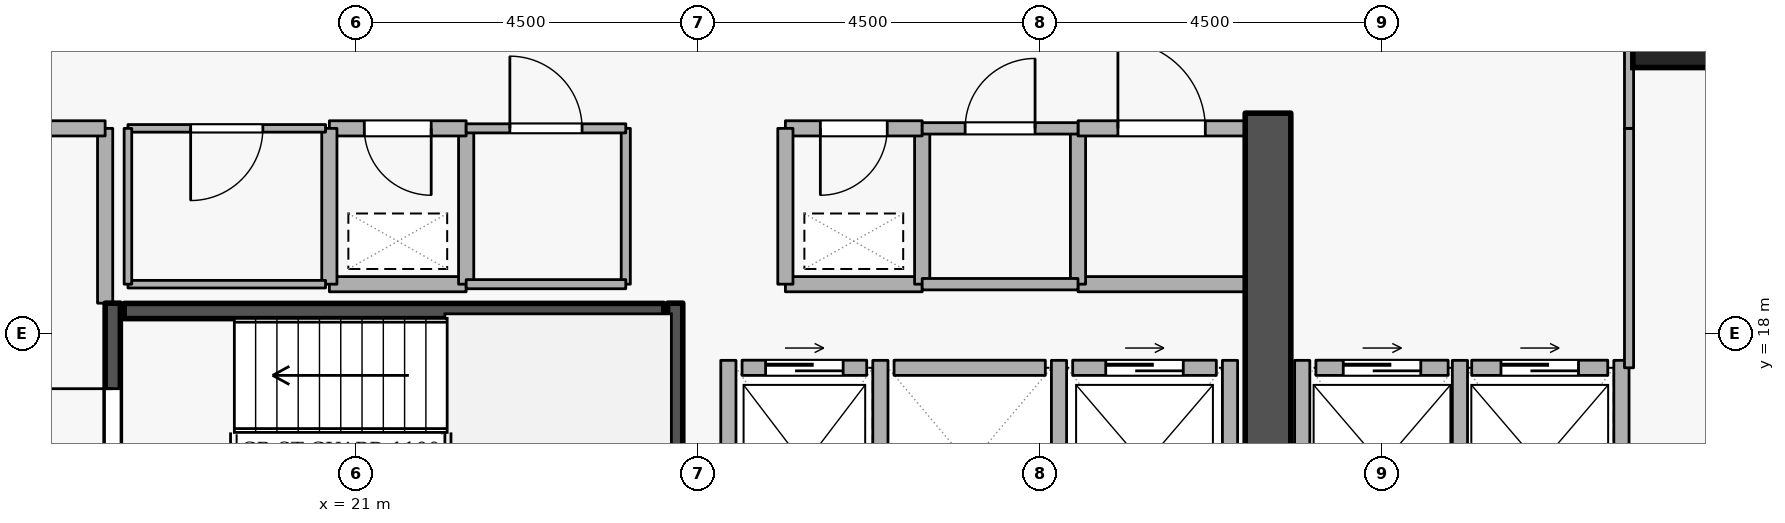
"""IFC4 building model, lengths in metres.
Left out: names, types, materials, properties, quantities, classifications, styles, units other than length and angle.
Written with IfcOpenShell. Run it as: python <this file> out.ifc"""

import sys

from ifc_helpers import new_model, si_unit, direction, frame, frame_2d, origin, origin_2d, place, context, subcontext, project, spatial, rectangle, extrude, element, fill, save


model = new_model("IFC4")
c1 = context("Model", 3, precision=1e-05, world=origin(), true_north=direction((0.0, 1.0)))
c2 = subcontext(c1, "Body", "Model", "MODEL_VIEW")
j1 = project(units=[si_unit("LENGTHUNIT", "METRE"), si_unit("PLANEANGLEUNIT", "RADIAN")], contexts=[c1])
p1 = place(None, origin())
s1 = spatial("IfcSite", under=j1, at=p1, CompositionType="ELEMENT")
p2 = place(p1, origin())
s2 = spatial("IfcBuilding", under=s1, at=p2, CompositionType="ELEMENT")
p3 = place(p2, frame((0.0, 0.0, 27.9)))
s3 = spatial("IfcBuildingStorey", under=s2, at=p3, CompositionType="ELEMENT", Elevation=27.9)
p4 = place(p3, frame((33.0, 15.2, 0.0), z_axis=(0.0, 0.0, 1.0), x_axis=(0.0, 1.0, 0.0)))
e1 = element("IfcWall", 1, at=p4, inside=s3, PredefinedType="SHEAR", context=c2, shape_type="SweptSolid", body=[
    extrude(rectangle(XDim=5.7, YDim=0.6, at=frame_2d((2.85, 0.0))), origin(), (0.0, 0.0, 1.0), 3.6),
])
p5 = place(p3, frame((38.5, 22.2, 0.0), z_axis=(0.0, 0.0, 1.0), x_axis=(1.0, 0.0, 0.0)))
e2 = element("IfcColumn", 2, at=p5, inside=s3, PredefinedType="COLUMN", context=c2, shape_type="SweptSolid", body=[
    extrude(rectangle(XDim=1.4, YDim=1.4, at=origin_2d()), origin(), (0.0, 0.0, 1.0), 3.6),
])
p6 = place(p3, frame((26.08, 17.55, 0.0), z_axis=(0.0, 0.0, 1.0), x_axis=(1.0, 0.0, 0.0)))
e3 = element("IfcWall", 3, at=p6, inside=s3, PredefinedType="STANDARD", context=c2, shape_type="SweptSolid", body=[
    extrude(rectangle(XDim=1.64, YDim=0.2, at=frame_2d((0.82, 0.0))), origin(), (0.0, 0.0, 1.0), 3.34),
])
p7 = place(p6, frame((0.31, 0.0, 0.0)))
e4 = element("IfcOpeningElement", 4, at=p7, cuts=e3, PredefinedType="OPENING", context=c2, shape_type="SweptSolid", body=[
    extrude(rectangle(XDim=1.02, YDim=2.06, at=frame_2d((0.51, 1.03))), frame((0.0, 0.11, 0.0), z_axis=(0.0, -1.0, 0.0), x_axis=(1.0, 0.0, 0.0)), (0.0, 0.0, 1.0), 0.22),
])
p8 = place(p3, frame((28.08, 17.55, 0.0), z_axis=(0.0, 0.0, 1.0), x_axis=(1.0, 0.0, 0.0)))
e5 = element("IfcWall", 5, at=p8, inside=s3, PredefinedType="STANDARD", context=c2, shape_type="SweptSolid", body=[
    extrude(rectangle(XDim=1.99, YDim=0.2, at=frame_2d((0.995, 0.0))), origin(), (0.0, 0.0, 1.0), 3.34),
])
p9 = place(p3, frame((30.43, 17.55, 0.0), z_axis=(0.0, 0.0, 1.0), x_axis=(1.0, 0.0, 0.0)))
e6 = element("IfcWall", 6, at=p9, inside=s3, PredefinedType="STANDARD", context=c2, shape_type="SweptSolid", body=[
    extrude(rectangle(XDim=1.89, YDim=0.2, at=frame_2d((0.945, 0.0))), origin(), (0.0, 0.0, 1.0), 3.34),
])
p10 = place(p9, frame((0.435, 0.0, 0.0)))
e7 = element("IfcOpeningElement", 7, at=p10, cuts=e6, PredefinedType="OPENING", context=c2, shape_type="SweptSolid", body=[
    extrude(rectangle(XDim=1.02, YDim=2.06, at=frame_2d((0.51, 1.03))), frame((0.0, 0.11, 0.0), z_axis=(0.0, -1.0, 0.0), x_axis=(1.0, 0.0, 0.0)), (0.0, 0.0, 1.0), 0.22),
])
p11 = place(p3, frame((33.63, 17.55, 0.0), z_axis=(0.0, 0.0, 1.0), x_axis=(1.0, 0.0, 0.0)))
e8 = element("IfcWall", 8, at=p11, inside=s3, PredefinedType="STANDARD", context=c2, shape_type="SweptSolid", body=[
    extrude(rectangle(XDim=1.74, YDim=0.2, at=frame_2d((0.87, 0.0))), origin(), (0.0, 0.0, 1.0), 3.34),
])
p12 = place(p11, frame((0.36, 0.0, 0.0)))
e9 = element("IfcOpeningElement", 9, at=p12, cuts=e8, PredefinedType="OPENING", context=c2, shape_type="SweptSolid", body=[
    extrude(rectangle(XDim=1.02, YDim=2.06, at=frame_2d((0.51, 1.03))), frame((0.0, 0.11, 0.0), z_axis=(0.0, -1.0, 0.0), x_axis=(1.0, 0.0, 0.0)), (0.0, 0.0, 1.0), 0.22),
])
p13 = place(p3, frame((35.68, 17.55, 0.0), z_axis=(0.0, 0.0, 1.0), x_axis=(1.0, 0.0, 0.0)))
e10 = element("IfcWall", 10, at=p13, inside=s3, PredefinedType="STANDARD", context=c2, shape_type="SweptSolid", body=[
    extrude(rectangle(XDim=1.79, YDim=0.2, at=frame_2d((0.895, 0.0))), origin(), (0.0, 0.0, 1.0), 3.34),
])
p14 = place(p13, frame((0.385, 0.0, 0.0)))
e11 = element("IfcOpeningElement", 11, at=p14, cuts=e10, PredefinedType="OPENING", context=c2, shape_type="SweptSolid", body=[
    extrude(rectangle(XDim=1.02, YDim=2.06, at=frame_2d((0.51, 1.03))), frame((0.0, 0.11, 0.0), z_axis=(0.0, -1.0, 0.0), x_axis=(1.0, 0.0, 0.0)), (0.0, 0.0, 1.0), 0.22),
])
for number, where, z_axis, x_axis in (
    (12, (27.9, 15.212, 0.0), (0.0, 0.0, 1.0), (0.0, 1.0, 0.0)),
    (13, (25.9, 15.212, 0.0), (0.0, 0.0, 1.0), (0.0, 1.0, 0.0)),
    (14, (30.25, 15.212, 0.0), (0.0, 0.0, 1.0), (0.0, 1.0, 0.0)),
    (15, (32.5, 15.212, 0.0), (0.0, 0.0, 1.0), (0.0, 1.0, 0.0)),
):
    element("IfcWall", number, at=place(p3, frame(where, z_axis=z_axis, x_axis=x_axis)), inside=s3, PredefinedType="STANDARD", context=c2, shape_type="SweptSolid", body=[
        extrude(rectangle(XDim=2.436, YDim=0.2, at=frame_2d((1.218, 0.0))), origin(), (0.0, 0.0, 1.0), 3.34),
    ])
for number, where, z_axis, x_axis in (
    (16, (35.525, 15.012, 0.0), (0.0, 0.0, 1.0), (0.0, 1.0, 0.0)),
    (17, (33.45, 15.012, 0.0), (0.0, 0.0, 1.0), (0.0, 1.0, 0.0)),
    (18, (37.65, 15.012, 0.0), (0.0, 0.0, 1.0), (0.0, 1.0, 0.0)),
):
    element("IfcWall", number, at=place(p3, frame(where, z_axis=z_axis, x_axis=x_axis)), inside=s3, PredefinedType="STANDARD", context=c2, shape_type="SweptSolid", body=[
        extrude(rectangle(XDim=2.636, YDim=0.2, at=frame_2d((1.318, 0.0))), origin(), (0.0, 0.0, 1.0), 3.34),
    ])
p15 = place(p3, frame((17.8, 15.05, 0.0), z_axis=(0.0, 0.0, 1.0), x_axis=(0.0, 1.0, 0.0)))
e19 = element("IfcWall", 19, at=p15, inside=s3, PredefinedType="SHEAR", context=c2, shape_type="SweptSolid", body=[
    extrude(rectangle(XDim=3.35, YDim=0.2, at=frame_2d((1.675, 0.0))), origin(), (0.0, 0.0, 1.0), 3.6),
])
p16 = place(p15, frame((1.125, 0.0, 0.0)))
e20 = element("IfcOpeningElement", 20, at=p16, cuts=e19, PredefinedType="OPENING", context=c2, shape_type="SweptSolid", body=[
    extrude(rectangle(XDim=1.1, YDim=2.1, at=frame_2d((0.55, 1.05))), frame((0.0, 0.11, 0.0), z_axis=(0.0, -1.0, 0.0), x_axis=(1.0, 0.0, 0.0)), (0.0, 0.0, 1.0), 0.22),
])
p17 = place(p3, frame((25.2, 18.4, 0.0), z_axis=(0.0, 0.0, 1.0), x_axis=(0.0, -1.0, 0.0)))
e21 = element("IfcWall", 21, at=p17, inside=s3, PredefinedType="SHEAR", context=c2, shape_type="SweptSolid", body=[
    extrude(rectangle(XDim=3.35, YDim=0.2, at=frame_2d((1.675, 0.0))), origin(), (0.0, 0.0, 1.0), 3.6),
])
p18 = place(p3, frame((25.05, 18.297, 0.0), z_axis=(0.0, 0.0, 1.0), x_axis=(-1.0, 0.0, 0.0)))
e22 = element("IfcWall", 22, at=p18, inside=s3, PredefinedType="SHEAR", context=c2, shape_type="SweptSolid", body=[
    extrude(rectangle(XDim=7.1, YDim=0.2, at=frame_2d((3.55, 0.0))), origin(), (0.0, 0.0, 1.0), 3.6),
])
p19 = place(p3, frame((17.7, 18.4, 0.0), z_axis=(0.0, 0.0, 1.0), x_axis=(0.0, 1.0, 0.0)))
e23 = element("IfcWall", 23, at=p19, inside=s3, PredefinedType="STANDARD", context=c2, shape_type="SweptSolid", body=[
    extrude(rectangle(XDim=2.3, YDim=0.2, at=frame_2d((1.15, 0.0))), origin(), (0.0, 0.0, 1.0), 2.545),
])
p20 = place(p3, frame((17.7, 20.7, 0.0), z_axis=(0.0, 0.0, 1.0), x_axis=(-1.0, 0.0, 0.0)))
e24 = element("IfcWall", 24, at=p20, inside=s3, PredefinedType="STANDARD", context=c2, shape_type="SweptSolid", body=[
    extrude(rectangle(XDim=2.5, YDim=0.2, at=frame_2d((1.25, 0.0))), origin(), (0.0, 0.0, 1.0), 3.34),
])
p21 = place(p3, frame((26.65, 18.65, 0.0), z_axis=(0.0, 0.0, 1.0), x_axis=(1.0, 0.0, 0.0)))
e25 = element("IfcWall", 25, at=p21, inside=s3, PredefinedType="STANDARD", context=c2, shape_type="SweptSolid", body=[
    extrude(rectangle(XDim=1.8, YDim=0.2, at=frame_2d((0.9, 0.0))), origin(), (0.0, 0.0, 1.0), 3.34),
])
p22 = place(p3, frame((28.45, 18.65, 0.0), z_axis=(0.0, 0.0, 1.0), x_axis=(0.0, 1.0, 0.0)))
e26 = element("IfcWall", 26, at=p22, inside=s3, PredefinedType="STANDARD", context=c2, shape_type="SweptSolid", body=[
    extrude(rectangle(XDim=2.05, YDim=0.2, at=frame_2d((1.025, 0.0))), origin(), (0.0, 0.0, 1.0), 3.34),
])
p23 = place(p3, frame((28.45, 20.7, 0.0), z_axis=(0.0, 0.0, 1.0), x_axis=(-1.0, 0.0, 0.0)))
e27 = element("IfcWall", 27, at=p23, inside=s3, PredefinedType="STANDARD", context=c2, shape_type="SweptSolid", body=[
    extrude(rectangle(XDim=1.8, YDim=0.2, at=frame_2d((0.9, 0.0))), origin(), (0.0, 0.0, 1.0), 3.34),
])
p24 = place(p23, frame((0.46, 0.0, 0.0)))
e28 = element("IfcOpeningElement", 28, at=p24, cuts=e27, PredefinedType="OPENING", context=c2, shape_type="SweptSolid", body=[
    extrude(rectangle(XDim=0.88, YDim=2.04, at=frame_2d((0.44, 1.02))), frame((0.0, 0.11, 0.0), z_axis=(0.0, -1.0, 0.0), x_axis=(1.0, 0.0, 0.0)), (0.0, 0.0, 1.0), 0.22),
])
p25 = place(p3, frame((26.65, 20.7, 0.0), z_axis=(0.0, 0.0, 1.0), x_axis=(0.0, -1.0, 0.0)))
e29 = element("IfcWall", 29, at=p25, inside=s3, PredefinedType="STANDARD", context=c2, shape_type="SweptSolid", body=[
    extrude(rectangle(XDim=2.05, YDim=0.2, at=frame_2d((1.025, 0.0))), origin(), (0.0, 0.0, 1.0), 3.34),
])
p26 = place(p3, frame((20.65, 18.65, 0.0), z_axis=(0.0, 0.0, 1.0), x_axis=(1.0, 0.0, 0.0)))
e30 = element("IfcWall", 30, at=p26, inside=s3, PredefinedType="STANDARD", context=c2, shape_type="SweptSolid", body=[
    extrude(rectangle(XDim=1.8, YDim=0.2, at=frame_2d((0.9, 0.0))), origin(), (0.0, 0.0, 1.0), 3.34),
])
p27 = place(p3, frame((22.45, 18.65, 0.0), z_axis=(0.0, 0.0, 1.0), x_axis=(0.0, 1.0, 0.0)))
e31 = element("IfcWall", 31, at=p27, inside=s3, PredefinedType="STANDARD", context=c2, shape_type="SweptSolid", body=[
    extrude(rectangle(XDim=2.05, YDim=0.2, at=frame_2d((1.025, 0.0))), origin(), (0.0, 0.0, 1.0), 3.34),
])
p28 = place(p3, frame((22.45, 20.7, 0.0), z_axis=(0.0, 0.0, 1.0), x_axis=(-1.0, 0.0, 0.0)))
e32 = element("IfcWall", 32, at=p28, inside=s3, PredefinedType="STANDARD", context=c2, shape_type="SweptSolid", body=[
    extrude(rectangle(XDim=1.8, YDim=0.2, at=frame_2d((0.9, 0.0))), origin(), (0.0, 0.0, 1.0), 3.34),
])
p29 = place(p28, frame((0.46, 0.0, 0.0)))
e33 = element("IfcOpeningElement", 33, at=p29, cuts=e32, PredefinedType="OPENING", context=c2, shape_type="SweptSolid", body=[
    extrude(rectangle(XDim=0.88, YDim=2.04, at=frame_2d((0.44, 1.02))), frame((0.0, 0.11, 0.0), z_axis=(0.0, -1.0, 0.0), x_axis=(1.0, 0.0, 0.0)), (0.0, 0.0, 1.0), 0.22),
])
p30 = place(p3, frame((20.65, 20.7, 0.0), z_axis=(0.0, 0.0, 1.0), x_axis=(0.0, -1.0, 0.0)))
e34 = element("IfcWall", 34, at=p30, inside=s3, PredefinedType="STANDARD", context=c2, shape_type="SweptSolid", body=[
    extrude(rectangle(XDim=2.05, YDim=0.2, at=frame_2d((1.025, 0.0))), origin(), (0.0, 0.0, 1.0), 3.34),
])
p31 = place(p3, frame((32.7, 18.65, 0.0), z_axis=(0.0, 0.0, 1.0), x_axis=(-1.0, 0.0, 0.0)))
e35 = element("IfcWall", 35, at=p31, inside=s3, PredefinedType="STANDARD", context=c2, shape_type="SweptSolid", body=[
    extrude(rectangle(XDim=2.2, YDim=0.2, at=frame_2d((1.1, 0.0))), origin(), (0.0, 0.0, 1.0), 3.34),
])
p32 = place(p3, frame((30.5, 18.65, 0.0), z_axis=(0.0, 0.0, 1.0), x_axis=(0.0, 1.0, 0.0)))
e36 = element("IfcWall", 36, at=p32, inside=s3, PredefinedType="STANDARD", context=c2, shape_type="SweptSolid", body=[
    extrude(rectangle(XDim=2.05, YDim=0.2, at=frame_2d((1.025, 0.0))), origin(), (0.0, 0.0, 1.0), 3.34),
])
p33 = place(p3, frame((30.5, 20.7, 0.0), z_axis=(0.0, 0.0, 1.0), x_axis=(1.0, 0.0, 0.0)))
e37 = element("IfcWall", 37, at=p33, inside=s3, PredefinedType="STANDARD", context=c2, shape_type="SweptSolid", body=[
    extrude(rectangle(XDim=2.2, YDim=0.2, at=frame_2d((1.1, 0.0))), origin(), (0.0, 0.0, 1.0), 3.34),
])
p34 = place(p33, frame((0.525, 0.0, 0.0)))
e38 = element("IfcOpeningElement", 38, at=p34, cuts=e37, PredefinedType="OPENING", context=c2, shape_type="SweptSolid", body=[
    extrude(rectangle(XDim=1.15, YDim=2.1, at=frame_2d((0.575, 1.05))), frame((0.0, 0.11, 0.0), z_axis=(0.0, -1.0, 0.0), x_axis=(1.0, 0.0, 0.0)), (0.0, 0.0, 1.0), 0.22),
])
p35 = place(p3, frame((18.0, 18.65, 0.0), z_axis=(0.0, 0.0, 1.0), x_axis=(1.0, 0.0, 0.0)))
e39 = element("IfcWall", 39, at=p35, inside=s3, PredefinedType="PARTITIONING", context=c2, shape_type="SweptSolid", body=[
    extrude(rectangle(XDim=2.6, YDim=0.1, at=frame_2d((1.3, 0.0))), origin(), (0.0, 0.0, 1.0), 3.34),
])
p36 = place(p3, frame((20.6, 20.7, 0.0), z_axis=(0.0, 0.0, 1.0), x_axis=(-1.0, 0.0, 0.0)))
e40 = element("IfcWall", 40, at=p36, inside=s3, PredefinedType="PARTITIONING", context=c2, shape_type="SweptSolid", body=[
    extrude(rectangle(XDim=2.6, YDim=0.1, at=frame_2d((1.3, 0.0))), origin(), (0.0, 0.0, 1.0), 3.34),
])
p37 = place(p36, frame((0.825, 0.0, 0.0)))
e41 = element("IfcOpeningElement", 41, at=p37, cuts=e40, PredefinedType="OPENING", context=c2, shape_type="SweptSolid", body=[
    extrude(rectangle(XDim=0.95, YDim=2.1, at=frame_2d((0.475, 1.05))), frame((0.0, 0.06, 0.0), z_axis=(0.0, -1.0, 0.0), x_axis=(1.0, 0.0, 0.0)), (0.0, 0.0, 1.0), 0.12),
])
p38 = place(p3, frame((18.0, 20.7, 0.0), z_axis=(0.0, 0.0, 1.0), x_axis=(0.0, -1.0, 0.0)))
e42 = element("IfcWall", 42, at=p38, inside=s3, PredefinedType="PARTITIONING", context=c2, shape_type="SweptSolid", body=[
    extrude(rectangle(XDim=2.05, YDim=0.1, at=frame_2d((1.025, 0.0))), origin(), (0.0, 0.0, 1.0), 2.545),
])
p39 = place(p3, frame((24.55, 20.7, 0.0), z_axis=(0.0, 0.0, 1.0), x_axis=(0.0, -1.0, 0.0)))
e43 = element("IfcWall", 43, at=p39, inside=s3, PredefinedType="PARTITIONING", context=c2, shape_type="SweptSolid", body=[
    extrude(rectangle(XDim=2.05, YDim=0.12, at=frame_2d((1.025, 0.0))), origin(), (0.0, 0.0, 1.0), 3.34),
])
p40 = place(p3, frame((24.55, 18.65, 0.0), z_axis=(0.0, 0.0, 1.0), x_axis=(-1.0, 0.0, 0.0)))
e44 = element("IfcWall", 44, at=p40, inside=s3, PredefinedType="PARTITIONING", context=c2, shape_type="SweptSolid", body=[
    extrude(rectangle(XDim=2.1, YDim=0.12, at=frame_2d((1.05, 0.0))), origin(), (0.0, 0.0, 1.0), 3.34),
])
p41 = place(p3, frame((22.45, 20.7, 0.0), z_axis=(0.0, 0.0, 1.0), x_axis=(1.0, 0.0, 0.0)))
e45 = element("IfcWall", 45, at=p41, inside=s3, PredefinedType="PARTITIONING", context=c2, shape_type="SweptSolid", body=[
    extrude(rectangle(XDim=2.1, YDim=0.12, at=frame_2d((1.05, 0.0))), origin(), (0.0, 0.0, 1.0), 3.34),
])
p42 = place(p41, frame((0.575, 0.0, 0.0)))
e46 = element("IfcOpeningElement", 46, at=p42, cuts=e45, PredefinedType="OPENING", context=c2, shape_type="SweptSolid", body=[
    extrude(rectangle(XDim=0.95, YDim=2.1, at=frame_2d((0.475, 1.05))), frame((0.0, 0.07, 0.0), z_axis=(0.0, -1.0, 0.0), x_axis=(1.0, 0.0, 0.0)), (0.0, 0.0, 1.0), 0.14),
])
p43 = place(p3, frame((30.5, 18.65, 0.0), z_axis=(0.0, 0.0, 1.0), x_axis=(-1.0, 0.0, 0.0)))
e47 = element("IfcWall", 47, at=p43, inside=s3, PredefinedType="PARTITIONING", context=c2, shape_type="SweptSolid", body=[
    extrude(rectangle(XDim=2.05, YDim=0.15, at=frame_2d((1.025, 0.0))), origin(), (0.0, 0.0, 1.0), 3.34),
])
p44 = place(p3, frame((28.45, 20.7, 0.0), z_axis=(0.0, 0.0, 1.0), x_axis=(1.0, 0.0, 0.0)))
e48 = element("IfcWall", 48, at=p44, inside=s3, PredefinedType="PARTITIONING", context=c2, shape_type="SweptSolid", body=[
    extrude(rectangle(XDim=2.05, YDim=0.15, at=frame_2d((1.025, 0.0))), origin(), (0.0, 0.0, 1.0), 3.34),
])
p45 = place(p44, frame((0.565, 0.0, 0.0)))
e49 = element("IfcOpeningElement", 49, at=p45, cuts=e48, PredefinedType="OPENING", context=c2, shape_type="SweptSolid", body=[
    extrude(rectangle(XDim=0.92, YDim=2.08, at=frame_2d((0.46, 1.04))), frame((0.0, 0.085, 0.0), z_axis=(0.0, -1.0, 0.0), x_axis=(1.0, 0.0, 0.0)), (0.0, 0.0, 1.0), 0.17),
])
p46 = place(p3, frame((37.75, 17.55, 0.0), z_axis=(0.0, 0.0, 1.0), x_axis=(0.0, 1.0, 0.0)))
e50 = element("IfcWall", 50, at=p46, inside=s3, PredefinedType="PARTITIONING", context=c2, shape_type="SweptSolid", body=[
    extrude(rectangle(XDim=3.15, YDim=0.12, at=frame_2d((1.575, 0.0))), origin(), (0.0, 0.0, 1.0), 3.34),
])
p47 = place(p3, frame((37.75, 20.7, 0.0), z_axis=(0.0, 0.0, 1.0), x_axis=(0.0, 1.0, 0.0)))
e51 = element("IfcWall", 51, at=p47, inside=s3, PredefinedType="PARTITIONING", context=c2, shape_type="SweptSolid", body=[
    extrude(rectangle(XDim=1.85, YDim=0.12, at=frame_2d((0.925, 0.0))), origin(), (0.0, 0.0, 1.0), 3.34),
])
p48 = place(p7, origin())
e52 = element("IfcDoor", 52, at=p48, inside=s3, OperationType="SLIDING_TO_LEFT", PredefinedType="DOOR", context=c2, shape_type="SweptSolid", body=[
    extrude(rectangle(XDim=1.02, YDim=2.06, at=frame_2d((0.51, 1.03))), frame((0.0, 0.025, 0.0), z_axis=(0.0, -1.0, 0.0), x_axis=(1.0, 0.0, 0.0)), (0.0, 0.0, 1.0), 0.05),
])
fill(e4, e52)
p49 = place(p10, origin())
e53 = element("IfcDoor", 53, at=p49, inside=s3, OperationType="SLIDING_TO_LEFT", PredefinedType="DOOR", context=c2, shape_type="SweptSolid", body=[
    extrude(rectangle(XDim=1.02, YDim=2.06, at=frame_2d((0.51, 1.03))), frame((0.0, 0.025, 0.0), z_axis=(0.0, -1.0, 0.0), x_axis=(1.0, 0.0, 0.0)), (0.0, 0.0, 1.0), 0.05),
])
fill(e7, e53)
p50 = place(p12, origin())
e54 = element("IfcDoor", 54, at=p50, inside=s3, OperationType="SLIDING_TO_LEFT", PredefinedType="DOOR", context=c2, shape_type="SweptSolid", body=[
    extrude(rectangle(XDim=1.02, YDim=2.06, at=frame_2d((0.51, 1.03))), frame((0.0, 0.025, 0.0), z_axis=(0.0, -1.0, 0.0), x_axis=(1.0, 0.0, 0.0)), (0.0, 0.0, 1.0), 0.05),
])
fill(e9, e54)
p51 = place(p14, origin())
e55 = element("IfcDoor", 55, at=p51, inside=s3, OperationType="SLIDING_TO_LEFT", PredefinedType="DOOR", context=c2, shape_type="SweptSolid", body=[
    extrude(rectangle(XDim=1.02, YDim=2.06, at=frame_2d((0.51, 1.03))), frame((0.0, 0.025, 0.0), z_axis=(0.0, -1.0, 0.0), x_axis=(1.0, 0.0, 0.0)), (0.0, 0.0, 1.0), 0.05),
])
fill(e11, e55)
p52 = place(p16, origin())
e56 = element("IfcDoor", 56, at=p52, inside=s3, OperationType="SINGLE_SWING_RIGHT", PredefinedType="DOOR", context=c2, shape_type="SweptSolid", body=[
    extrude(rectangle(XDim=1.1, YDim=2.1, at=frame_2d((0.55, 1.05))), frame((0.0, 0.025, 0.0), z_axis=(0.0, -1.0, 0.0), x_axis=(1.0, 0.0, 0.0)), (0.0, 0.0, 1.0), 0.05),
])
fill(e20, e56)
p53 = place(p24, origin())
e57 = element("IfcDoor", 57, at=p53, inside=s3, OperationType="SINGLE_SWING_RIGHT", PredefinedType="DOOR", context=c2, shape_type="SweptSolid", body=[
    extrude(rectangle(XDim=0.88, YDim=2.04, at=frame_2d((0.44, 1.02))), frame((0.0, 0.025, 0.0), z_axis=(0.0, -1.0, 0.0), x_axis=(1.0, 0.0, 0.0)), (0.0, 0.0, 1.0), 0.05),
])
fill(e28, e57)
p54 = place(p29, origin())
e58 = element("IfcDoor", 58, at=p54, inside=s3, OperationType="SINGLE_SWING_LEFT", PredefinedType="DOOR", context=c2, shape_type="SweptSolid", body=[
    extrude(rectangle(XDim=0.88, YDim=2.04, at=frame_2d((0.44, 1.02))), frame((0.0, 0.025, 0.0), z_axis=(0.0, -1.0, 0.0), x_axis=(1.0, 0.0, 0.0)), (0.0, 0.0, 1.0), 0.05),
])
fill(e33, e58)
p55 = place(p37, origin())
e59 = element("IfcDoor", 59, at=p55, inside=s3, OperationType="SINGLE_SWING_RIGHT", PredefinedType="DOOR", context=c2, shape_type="SweptSolid", body=[
    extrude(rectangle(XDim=0.95, YDim=2.1, at=frame_2d((0.475, 1.05))), frame((0.0, 0.025, 0.0), z_axis=(0.0, -1.0, 0.0), x_axis=(1.0, 0.0, 0.0)), (0.0, 0.0, 1.0), 0.05),
])
fill(e41, e59)
p56 = place(p42, origin())
e60 = element("IfcDoor", 60, at=p56, inside=s3, OperationType="SINGLE_SWING_LEFT", PredefinedType="DOOR", context=c2, shape_type="SweptSolid", body=[
    extrude(rectangle(XDim=0.95, YDim=2.1, at=frame_2d((0.475, 1.05))), frame((0.0, 0.025, 0.0), z_axis=(0.0, -1.0, 0.0), x_axis=(1.0, 0.0, 0.0)), (0.0, 0.0, 1.0), 0.05),
])
fill(e46, e60)
p57 = place(p45, origin())
e61 = element("IfcDoor", 61, at=p57, inside=s3, OperationType="SINGLE_SWING_RIGHT", PredefinedType="DOOR", context=c2, shape_type="SweptSolid", body=[
    extrude(rectangle(XDim=0.92, YDim=2.08, at=frame_2d((0.46, 1.04))), frame((0.0, 0.025, 0.0), z_axis=(0.0, -1.0, 0.0), x_axis=(1.0, 0.0, 0.0)), (0.0, 0.0, 1.0), 0.05),
])
fill(e49, e61)
p58 = place(p34, origin())
e62 = element("IfcDoor", 62, at=p58, inside=s3, OperationType="SINGLE_SWING_LEFT", PredefinedType="DOOR", context=c2, shape_type="SweptSolid", body=[
    extrude(rectangle(XDim=1.15, YDim=2.1, at=frame_2d((0.575, 1.05))), frame((0.0, 0.025, 0.0), z_axis=(0.0, -1.0, 0.0), x_axis=(1.0, 0.0, 0.0)), (0.0, 0.0, 1.0), 0.05),
])
fill(e38, e62)
save(model, sys.argv[1])
